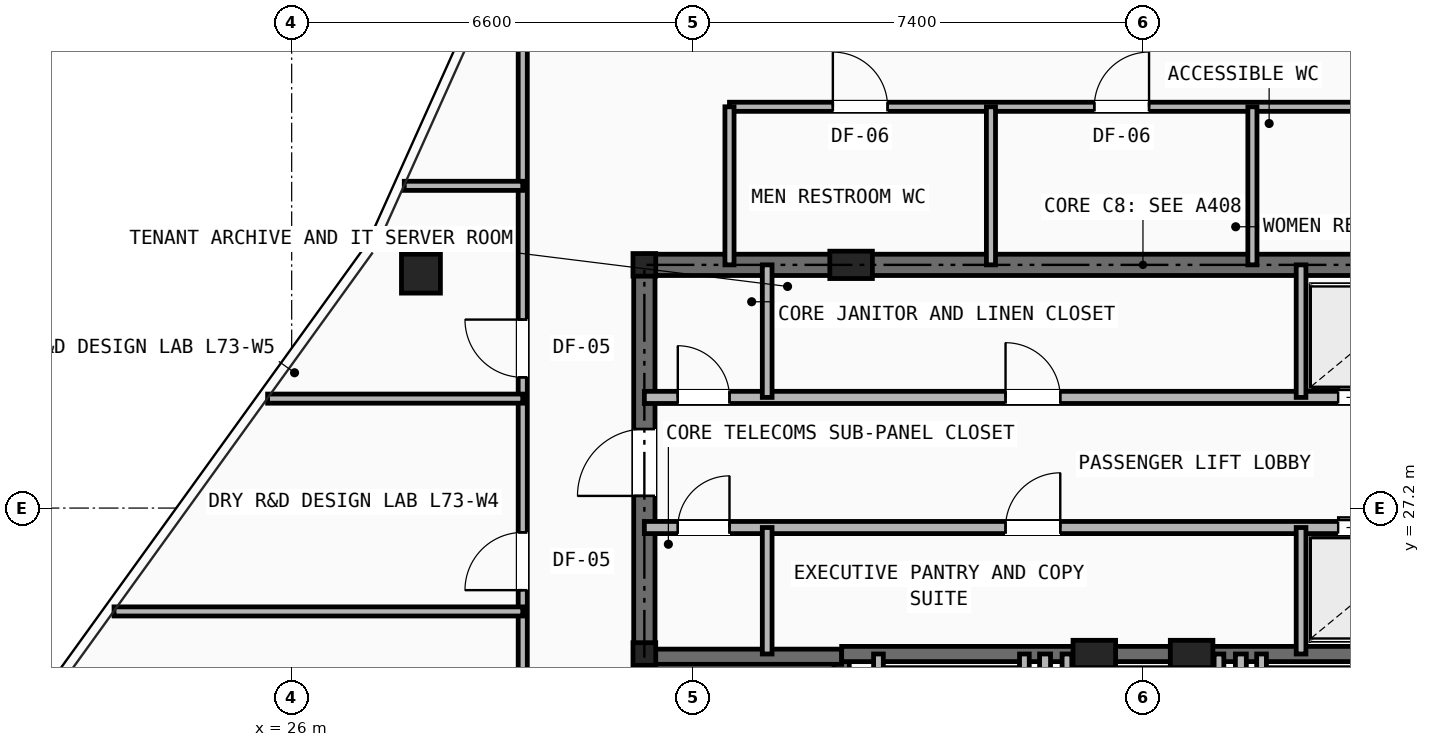
"""IFC4 building model, lengths in metres.
Left out: names, types, materials, properties, quantities, classifications, styles, units other than length and angle.
Written with IfcOpenShell. Run it as: python <this file> out.ifc"""

import sys

from ifc_helpers import new_model, si_unit, direction, frame, frame_2d, origin, origin_2d, place, context, subcontext, project, spatial, rectangle, hollow_rectangle, i_section, extrude, element, fill, save


model = new_model("IFC4")
c1 = context("Model", 3, precision=1e-05, world=origin(), true_north=direction((0.0, 1.0)))
c2 = subcontext(c1, "Body", "Model", "MODEL_VIEW")
j1 = project(units=[si_unit("LENGTHUNIT", "METRE"), si_unit("PLANEANGLEUNIT", "RADIAN")], contexts=[c1])
p1 = place(None, origin())
s1 = spatial("IfcSite", under=j1, at=p1, CompositionType="ELEMENT")
p2 = place(p1, origin())
s2 = spatial("IfcBuilding", under=s1, at=p2, CompositionType="ELEMENT")
p3 = place(p2, frame((0.0, 0.0, 258.5)))
s3 = spatial("IfcBuildingStorey", under=s2, at=p3, CompositionType="ELEMENT", Elevation=258.5)
for number, where, z_axis, x_axis in (
    (1, (31.8, 24.8, 0.0), (0.0, 0.0, 1.0), (1.0, 0.0, 0.0)),
    (2, (31.8, 31.2, 0.0), (0.0, 0.0, 1.0), (1.0, 0.0, 0.0)),
):
    element("IfcColumn", number, at=place(p3, frame(where, z_axis=z_axis, x_axis=x_axis)), inside=s3, PredefinedType="COLUMN", context=c2, shape_type="SweptSolid", body=[
        extrude(i_section(OverallWidth=0.374, OverallDepth=0.372, WebThickness=0.016, FlangeThickness=0.026, at=origin_2d()), origin(), (0.0, 0.0, 1.0), 3.5),
    ])
for number, where, z_axis, x_axis in (
    (3, (35.2, 31.2, 0.0), (0.0, 0.0, 1.0), (1.0, 0.0, 0.0)),
    (4, (39.2, 24.8, 0.0), (0.0, 0.0, 1.0), (1.0, 0.0, 0.0)),
    (5, (40.8, 24.8, 0.0), (0.0, 0.0, 1.0), (1.0, 0.0, 0.0)),
):
    element("IfcColumn", number, at=place(p3, frame(where, z_axis=z_axis, x_axis=x_axis)), inside=s3, PredefinedType="PILASTER", context=c2, shape_type="SweptSolid", body=[
        extrude(rectangle(XDim=0.7, YDim=0.45, at=origin_2d()), origin(), (0.0, 0.0, 1.0), 3.5),
    ])
p4 = place(p3, frame((28.126, 31.056, 0.0), z_axis=(0.0, 0.0, 1.0), x_axis=(1.0, 0.0, 0.0)))
e6 = element("IfcColumn", 6, at=p4, inside=s3, PredefinedType="COLUMN", context=c2, shape_type="SweptSolid", body=[
    extrude(hollow_rectangle(XDim=0.64, YDim=0.64, WallThickness=0.045, at=origin_2d()), origin(), (0.0, 0.0, 1.0), 3.5),
])
p5 = place(p3, frame((31.8, 31.2, 0.0), z_axis=(0.0, 0.0, 1.0), x_axis=(1.0, 0.0, 0.0)))
e7 = element("IfcWall", 7, at=p5, inside=s3, PredefinedType="SHEAR", context=c2, shape_type="SweptSolid", body=[
    extrude(rectangle(XDim=16.4, YDim=0.35, at=frame_2d((8.2, 0.0))), origin(), (0.0, 0.0, 1.0), 3.25),
])
p6 = place(p3, frame((31.8, 16.4, 0.0), z_axis=(0.0, 0.0, 1.0), x_axis=(0.0, 1.0, 0.0)))
e8 = element("IfcWall", 8, at=p6, inside=s3, PredefinedType="SHEAR", context=c2, shape_type="SweptSolid", body=[
    extrude(rectangle(XDim=14.8, YDim=0.35, at=frame_2d((7.4, 0.0))), origin(), (0.0, 0.0, 1.0), 3.25),
])
p7 = place(p6, frame((11.0, 0.0, 0.0)))
e9 = element("IfcOpeningElement", 9, at=p7, cuts=e8, PredefinedType="OPENING", context=c2, shape_type="SweptSolid", body=[
    extrude(rectangle(XDim=1.1, YDim=2.15, at=frame_2d((0.55, 1.075))), frame((0.0, 0.185, 0.0), z_axis=(0.0, -1.0, 0.0), x_axis=(1.0, 0.0, 0.0)), (0.0, 0.0, 1.0), 0.37),
])
p8 = place(p3, frame((35.045, 16.4, 0.0), z_axis=(0.0, 0.0, 1.0), x_axis=(0.0, 1.0, 0.0)))
e10 = element("IfcWall", 10, at=p8, inside=s3, PredefinedType="SHEAR", context=c2, shape_type="SweptSolid", body=[
    extrude(rectangle(XDim=8.4, YDim=0.25, at=frame_2d((4.2, 0.0))), origin(), (0.0, 0.0, 1.0), 3.25),
])
p9 = place(p8, frame((0.45, 0.0, 0.0)))
e11 = element("IfcOpeningElement", 11, at=p9, cuts=e10, PredefinedType="OPENING", context=c2, shape_type="SweptSolid", body=[
    extrude(rectangle(XDim=0.95, YDim=2.1, at=frame_2d((0.475, 1.05))), frame((0.0, 0.135, 0.0), z_axis=(0.0, -1.0, 0.0), x_axis=(1.0, 0.0, 0.0)), (0.0, 0.0, 1.0), 0.27),
])
p10 = place(p3, frame((31.8, 24.755, 0.0), z_axis=(0.0, 0.0, 1.0), x_axis=(1.0, 0.0, 0.0)))
e12 = element("IfcWall", 12, at=p10, inside=s3, PredefinedType="SHEAR", context=c2, shape_type="SweptSolid", body=[
    extrude(rectangle(XDim=3.245, YDim=0.25, at=frame_2d((1.623, 0.0))), origin(), (0.0, 0.0, 1.0), 3.25),
])
p11 = place(p3, frame((35.045, 24.8, 0.0), z_axis=(0.0, 0.0, 1.0), x_axis=(1.0, 0.0, 0.0)))
e13 = element("IfcWall", 13, at=p11, inside=s3, PredefinedType="SHEAR", context=c2, shape_type="SweptSolid", body=[
    extrude(rectangle(XDim=9.91, YDim=0.25, at=frame_2d((4.955, 0.0))), origin(), (0.0, 0.0, 1.0), 3.25),
])
p12 = place(p3, frame((38.39, 16.4, 0.0), z_axis=(0.0, 0.0, 1.0), x_axis=(0.0, 1.0, 0.0)))
e14 = element("IfcWall", 14, at=p12, inside=s3, PredefinedType="PARTITIONING", context=c2, shape_type="SweptSolid", body=[
    extrude(rectangle(XDim=8.4, YDim=0.18, at=frame_2d((4.2, 0.0))), origin(), (0.0, 0.0, 1.0), 2.705),
])
p13 = place(p12, frame((4.45, 0.0, 0.0)))
e15 = element("IfcOpeningElement", 15, at=p13, cuts=e14, PredefinedType="OPENING", context=c2, shape_type="SweptSolid", body=[
    extrude(rectangle(XDim=0.95, YDim=2.1, at=frame_2d((0.475, 1.05))), frame((0.0, 0.1, 0.0), z_axis=(0.0, -1.0, 0.0), x_axis=(1.0, 0.0, 0.0)), (0.0, 0.0, 1.0), 0.2),
])
p14 = place(p3, frame((41.61, 16.4, 0.0), z_axis=(0.0, 0.0, 1.0), x_axis=(0.0, 1.0, 0.0)))
e16 = element("IfcWall", 16, at=p14, inside=s3, PredefinedType="PARTITIONING", context=c2, shape_type="SweptSolid", body=[
    extrude(rectangle(XDim=8.4, YDim=0.18, at=frame_2d((4.2, 0.0))), origin(), (0.0, 0.0, 1.0), 2.705),
])
p15 = place(p14, frame((2.5, 0.0, 0.0)))
e17 = element("IfcOpeningElement", 17, at=p15, cuts=e16, PredefinedType="OPENING", context=c2, shape_type="SweptSolid", body=[
    extrude(rectangle(XDim=0.85, YDim=2.05, at=frame_2d((0.425, 1.025))), frame((0.0, 0.1, 0.0), z_axis=(0.0, -1.0, 0.0), x_axis=(1.0, 0.0, 0.0)), (0.0, 0.0, 1.0), 0.2),
])
for number, where, z_axis, x_axis in (
    (18, (35.65, 22.48, 0.0), (0.0, 0.0, 1.0), (0.0, 1.0, 0.0)),
    (19, (38.05, 22.48, 0.0), (0.0, 0.0, 1.0), (0.0, 1.0, 0.0)),
    (20, (41.95, 22.48, 0.0), (0.0, 0.0, 1.0), (0.0, 1.0, 0.0)),
    (21, (38.75, 22.48, 0.0), (0.0, 0.0, 1.0), (0.0, 1.0, 0.0)),
    (22, (41.25, 22.48, 0.0), (0.0, 0.0, 1.0), (0.0, 1.0, 0.0)),
):
    element("IfcWall", number, at=place(p3, frame(where, z_axis=z_axis, x_axis=x_axis)), inside=s3, PredefinedType="SOLIDWALL", context=c2, shape_type="SweptSolid", body=[
        extrude(rectangle(XDim=2.32, YDim=0.16, at=frame_2d((1.16, 0.0))), origin(), (0.0, 0.0, 1.0), 3.25),
    ])
p16 = place(p3, frame((31.8, 29.02, 0.0), z_axis=(0.0, 0.0, 1.0), x_axis=(1.0, 0.0, 0.0)))
e23 = element("IfcWall", 23, at=p16, inside=s3, PredefinedType="SOLIDWALL", context=c2, shape_type="SweptSolid", body=[
    extrude(rectangle(XDim=16.4, YDim=0.2, at=frame_2d((8.2, 0.0))), origin(), (0.0, 0.0, 1.0), 2.705),
])
p17 = place(p16, frame((0.55, 0.0, 0.0)))
e24 = element("IfcOpeningElement", 24, at=p17, cuts=e23, PredefinedType="OPENING", context=c2, shape_type="SweptSolid", body=[
    extrude(rectangle(XDim=0.85, YDim=2.05, at=frame_2d((0.425, 1.025))), frame((0.0, 0.11, 0.0), z_axis=(0.0, -1.0, 0.0), x_axis=(1.0, 0.0, 0.0)), (0.0, 0.0, 1.0), 0.22),
])
p18 = place(p16, frame((5.94, 0.0, 0.0)))
e25 = element("IfcOpeningElement", 25, at=p18, cuts=e23, PredefinedType="OPENING", context=c2, shape_type="SweptSolid", body=[
    extrude(rectangle(XDim=0.9, YDim=2.1, at=frame_2d((0.45, 1.05))), frame((0.0, 0.11, 0.0), z_axis=(0.0, -1.0, 0.0), x_axis=(1.0, 0.0, 0.0)), (0.0, 0.0, 1.0), 0.22),
])
p19 = place(p16, frame((11.41, 0.0, 0.0)))
e26 = element("IfcOpeningElement", 26, at=p19, cuts=e23, PredefinedType="OPENING", context=c2, shape_type="SweptSolid", body=[
    extrude(rectangle(XDim=1.1, YDim=2.15, at=frame_2d((0.55, 1.075))), frame((0.0, 0.11, 0.0), z_axis=(0.0, -1.0, 0.0), x_axis=(1.0, 0.0, 0.0)), (0.0, 0.0, 1.0), 0.22),
])
p20 = place(p16, frame((13.73, 0.0, 0.0)))
e27 = element("IfcOpeningElement", 27, at=p20, cuts=e23, PredefinedType="OPENING", context=c2, shape_type="SweptSolid", body=[
    extrude(rectangle(XDim=1.1, YDim=2.15, at=frame_2d((0.55, 1.075))), frame((0.0, 0.11, 0.0), z_axis=(0.0, -1.0, 0.0), x_axis=(1.0, 0.0, 0.0)), (0.0, 0.0, 1.0), 0.22),
])
p21 = place(p3, frame((31.8, 26.88, 0.0), z_axis=(0.0, 0.0, 1.0), x_axis=(1.0, 0.0, 0.0)))
e28 = element("IfcWall", 28, at=p21, inside=s3, PredefinedType="SOLIDWALL", context=c2, shape_type="SweptSolid", body=[
    extrude(rectangle(XDim=16.4, YDim=0.2, at=frame_2d((8.2, 0.0))), origin(), (0.0, 0.0, 1.0), 2.705),
])
p22 = place(p21, frame((0.55, 0.0, 0.0)))
e29 = element("IfcOpeningElement", 29, at=p22, cuts=e28, PredefinedType="OPENING", context=c2, shape_type="SweptSolid", body=[
    extrude(rectangle(XDim=0.85, YDim=2.05, at=frame_2d((0.425, 1.025))), frame((0.0, 0.11, 0.0), z_axis=(0.0, -1.0, 0.0), x_axis=(1.0, 0.0, 0.0)), (0.0, 0.0, 1.0), 0.22),
])
p23 = place(p21, frame((5.94, 0.0, 0.0)))
e30 = element("IfcOpeningElement", 30, at=p23, cuts=e28, PredefinedType="OPENING", context=c2, shape_type="SweptSolid", body=[
    extrude(rectangle(XDim=0.9, YDim=2.1, at=frame_2d((0.45, 1.05))), frame((0.0, 0.11, 0.0), z_axis=(0.0, -1.0, 0.0), x_axis=(1.0, 0.0, 0.0)), (0.0, 0.0, 1.0), 0.22),
])
p24 = place(p21, frame((11.41, 0.0, 0.0)))
e31 = element("IfcOpeningElement", 31, at=p24, cuts=e28, PredefinedType="OPENING", context=c2, shape_type="SweptSolid", body=[
    extrude(rectangle(XDim=1.1, YDim=2.15, at=frame_2d((0.55, 1.075))), frame((0.0, 0.11, 0.0), z_axis=(0.0, -1.0, 0.0), x_axis=(1.0, 0.0, 0.0)), (0.0, 0.0, 1.0), 0.22),
])
p25 = place(p21, frame((13.73, 0.0, 0.0)))
e32 = element("IfcOpeningElement", 32, at=p25, cuts=e28, PredefinedType="OPENING", context=c2, shape_type="SweptSolid", body=[
    extrude(rectangle(XDim=1.1, YDim=2.15, at=frame_2d((0.55, 1.075))), frame((0.0, 0.11, 0.0), z_axis=(0.0, -1.0, 0.0), x_axis=(1.0, 0.0, 0.0)), (0.0, 0.0, 1.0), 0.22),
])
p26 = place(p3, frame((33.82, 29.02, 0.0), z_axis=(0.0, 0.0, 1.0), x_axis=(0.0, 1.0, 0.0)))
e33 = element("IfcWall", 33, at=p26, inside=s3, PredefinedType="SOLIDWALL", context=c2, shape_type="SweptSolid", body=[
    extrude(rectangle(XDim=2.18, YDim=0.16, at=frame_2d((1.09, 0.0))), origin(), (0.0, 0.0, 1.0), 2.705),
])
p27 = place(p3, frame((33.82, 24.8, 0.0), z_axis=(0.0, 0.0, 1.0), x_axis=(0.0, 1.0, 0.0)))
e34 = element("IfcWall", 34, at=p27, inside=s3, PredefinedType="SOLIDWALL", context=c2, shape_type="SweptSolid", body=[
    extrude(rectangle(XDim=2.08, YDim=0.16, at=frame_2d((1.04, 0.0))), origin(), (0.0, 0.0, 1.0), 3.25),
])
p28 = place(p3, frame((42.6, 29.02, 0.0), z_axis=(0.0, 0.0, 1.0), x_axis=(0.0, 1.0, 0.0)))
e35 = element("IfcWall", 35, at=p28, inside=s3, PredefinedType="SOLIDWALL", context=c2, shape_type="SweptSolid", body=[
    extrude(rectangle(XDim=2.18, YDim=0.16, at=frame_2d((1.09, 0.0))), origin(), (0.0, 0.0, 1.0), 2.705),
])
p29 = place(p3, frame((42.6, 24.8, 0.0), z_axis=(0.0, 0.0, 1.0), x_axis=(0.0, 1.0, 0.0)))
e36 = element("IfcWall", 36, at=p29, inside=s3, PredefinedType="SOLIDWALL", context=c2, shape_type="SweptSolid", body=[
    extrude(rectangle(XDim=2.08, YDim=0.16, at=frame_2d((1.04, 0.0))), origin(), (0.0, 0.0, 1.0), 3.25),
])
p30 = place(p3, frame((33.2, 33.8, 0.0), z_axis=(0.0, 0.0, 1.0), x_axis=(1.0, 0.0, 0.0)))
e37 = element("IfcWall", 37, at=p30, inside=s3, PredefinedType="PARTITIONING", context=c2, shape_type="SweptSolid", body=[
    extrude(rectangle(XDim=13.0, YDim=0.15, at=frame_2d((6.5, 0.0))), origin(), (0.0, 0.0, 1.0), 3.25),
])
p31 = place(p30, frame((1.7, 0.0, 0.0)))
e38 = element("IfcOpeningElement", 38, at=p31, cuts=e37, PredefinedType="OPENING", context=c2, shape_type="SweptSolid", body=[
    extrude(rectangle(XDim=0.9, YDim=2.1, at=frame_2d((0.45, 1.05))), frame((0.0, 0.085, 0.0), z_axis=(0.0, -1.0, 0.0), x_axis=(1.0, 0.0, 0.0)), (0.0, 0.0, 1.0), 0.17),
])
p32 = place(p30, frame((6.0, 0.0, 0.0)))
e39 = element("IfcOpeningElement", 39, at=p32, cuts=e37, PredefinedType="OPENING", context=c2, shape_type="SweptSolid", body=[
    extrude(rectangle(XDim=0.9, YDim=2.1, at=frame_2d((0.45, 1.05))), frame((0.0, 0.085, 0.0), z_axis=(0.0, -1.0, 0.0), x_axis=(1.0, 0.0, 0.0)), (0.0, 0.0, 1.0), 0.17),
])
p33 = place(p30, frame((10.35, 0.0, 0.0)))
e40 = element("IfcOpeningElement", 40, at=p33, cuts=e37, PredefinedType="OPENING", context=c2, shape_type="SweptSolid", body=[
    extrude(rectangle(XDim=0.9, YDim=2.1, at=frame_2d((0.45, 1.05))), frame((0.0, 0.085, 0.0), z_axis=(0.0, -1.0, 0.0), x_axis=(1.0, 0.0, 0.0)), (0.0, 0.0, 1.0), 0.17),
])
for number, where, z_axis, x_axis in (
    (41, (33.2, 31.2, 0.0), (0.0, 0.0, 1.0), (0.0, 1.0, 0.0)),
    (42, (37.5, 31.2, 0.0), (0.0, 0.0, 1.0), (0.0, 1.0, 0.0)),
    (43, (41.8, 31.2, 0.0), (0.0, 0.0, 1.0), (0.0, 1.0, 0.0)),
):
    element("IfcWall", number, at=place(p3, frame(where, z_axis=z_axis, x_axis=x_axis)), inside=s3, PredefinedType="PARTITIONING", context=c2, shape_type="SweptSolid", body=[
        extrude(rectangle(XDim=2.6, YDim=0.15, at=frame_2d((1.3, 0.0))), origin(), (0.0, 0.0, 1.0), 2.705),
    ])
p34 = place(p3, frame((29.8, 16.4, 0.0), z_axis=(0.0, 0.0, 1.0), x_axis=(0.0, 1.0, 0.0)))
e44 = element("IfcWall", 44, at=p34, inside=s3, PredefinedType="PARTITIONING", context=c2, shape_type="SweptSolid", body=[
    extrude(rectangle(XDim=19.3, YDim=0.15, at=frame_2d((9.65, 0.0))), origin(), (0.0, 0.0, 1.0), 2.292),
])
p35 = place(p34, frame((0.35, 0.0, 0.0)))
e45 = element("IfcOpeningElement", 45, at=p35, cuts=e44, PredefinedType="OPENING", context=c2, shape_type="SweptSolid", body=[
    extrude(rectangle(XDim=0.95, YDim=2.1, at=frame_2d((0.475, 1.05))), frame((0.0, 0.085, 0.0), z_axis=(0.0, -1.0, 0.0), x_axis=(1.0, 0.0, 0.0)), (0.0, 0.0, 1.0), 0.17),
])
p36 = place(p34, frame((2.95, 0.0, 0.0)))
e46 = element("IfcOpeningElement", 46, at=p36, cuts=e44, PredefinedType="OPENING", context=c2, shape_type="SweptSolid", body=[
    extrude(rectangle(XDim=0.95, YDim=2.1, at=frame_2d((0.475, 1.05))), frame((0.0, 0.085, 0.0), z_axis=(0.0, -1.0, 0.0), x_axis=(1.0, 0.0, 0.0)), (0.0, 0.0, 1.0), 0.17),
])
p37 = place(p34, frame((6.15, 0.0, 0.0)))
e47 = element("IfcOpeningElement", 47, at=p37, cuts=e44, PredefinedType="OPENING", context=c2, shape_type="SweptSolid", body=[
    extrude(rectangle(XDim=0.95, YDim=2.1, at=frame_2d((0.475, 1.05))), frame((0.0, 0.085, 0.0), z_axis=(0.0, -1.0, 0.0), x_axis=(1.0, 0.0, 0.0)), (0.0, 0.0, 1.0), 0.17),
])
p38 = place(p34, frame((9.45, 0.0, 0.0)))
e48 = element("IfcOpeningElement", 48, at=p38, cuts=e44, PredefinedType="OPENING", context=c2, shape_type="SweptSolid", body=[
    extrude(rectangle(XDim=0.95, YDim=2.1, at=frame_2d((0.475, 1.05))), frame((0.0, 0.085, 0.0), z_axis=(0.0, -1.0, 0.0), x_axis=(1.0, 0.0, 0.0)), (0.0, 0.0, 1.0), 0.17),
])
p39 = place(p34, frame((12.95, 0.0, 0.0)))
e49 = element("IfcOpeningElement", 49, at=p39, cuts=e44, PredefinedType="OPENING", context=c2, shape_type="SweptSolid", body=[
    extrude(rectangle(XDim=0.95, YDim=2.1, at=frame_2d((0.475, 1.05))), frame((0.0, 0.085, 0.0), z_axis=(0.0, -1.0, 0.0), x_axis=(1.0, 0.0, 0.0)), (0.0, 0.0, 1.0), 0.17),
])
p40 = place(p3, frame((23.078, 25.5, 0.0), z_axis=(0.0, 0.0, 1.0), x_axis=(1.0, 0.0, 0.0)))
e50 = element("IfcWall", 50, at=p40, inside=s3, PredefinedType="PARTITIONING", context=c2, shape_type="SweptSolid", body=[
    extrude(rectangle(XDim=6.722, YDim=0.15, at=frame_2d((3.361, 0.0))), origin(), (0.0, 0.0, 1.0), 2.628),
])
p41 = place(p3, frame((25.604, 29.0, 0.0), z_axis=(0.0, 0.0, 1.0), x_axis=(1.0, 0.0, 0.0)))
e51 = element("IfcWall", 51, at=p41, inside=s3, PredefinedType="PARTITIONING", context=c2, shape_type="SweptSolid", body=[
    extrude(rectangle(XDim=4.196, YDim=0.15, at=frame_2d((2.098, 0.0))), origin(), (0.0, 0.0, 1.0), 2.628),
])
p42 = place(p3, frame((27.852, 32.5, 0.0), z_axis=(0.0, 0.0, 1.0), x_axis=(1.0, 0.0, 0.0)))
e52 = element("IfcWall", 52, at=p42, inside=s3, PredefinedType="PARTITIONING", context=c2, shape_type="SweptSolid", body=[
    extrude(rectangle(XDim=1.948, YDim=0.15, at=frame_2d((0.974, 0.0))), origin(), (0.0, 0.0, 1.0), 2.628),
])
p43 = place(p17, origin())
e53 = element("IfcDoor", 53, at=p43, inside=s3, OperationType="SINGLE_SWING_LEFT", PredefinedType="DOOR", context=c2, shape_type="SweptSolid", body=[
    extrude(rectangle(XDim=0.85, YDim=2.05, at=frame_2d((0.425, 1.025))), frame((0.0, 0.025, 0.0), z_axis=(0.0, -1.0, 0.0), x_axis=(1.0, 0.0, 0.0)), (0.0, 0.0, 1.0), 0.05),
])
fill(e24, e53)
p44 = place(p22, origin())
e54 = element("IfcDoor", 54, at=p44, inside=s3, OperationType="SINGLE_SWING_RIGHT", PredefinedType="DOOR", context=c2, shape_type="SweptSolid", body=[
    extrude(rectangle(XDim=0.85, YDim=2.05, at=frame_2d((0.425, 1.025))), frame((0.0, 0.025, 0.0), z_axis=(0.0, -1.0, 0.0), x_axis=(1.0, 0.0, 0.0)), (0.0, 0.0, 1.0), 0.05),
])
fill(e29, e54)
p45 = place(p7, origin())
e55 = element("IfcDoor", 55, at=p45, inside=s3, OperationType="SINGLE_SWING_LEFT", PredefinedType="DOOR", context=c2, shape_type="SweptSolid", body=[
    extrude(rectangle(XDim=1.1, YDim=2.15, at=frame_2d((0.55, 1.075))), frame((0.0, 0.025, 0.0), z_axis=(0.0, -1.0, 0.0), x_axis=(1.0, 0.0, 0.0)), (0.0, 0.0, 1.0), 0.05),
])
fill(e9, e55)
p46 = place(p18, origin())
e56 = element("IfcDoor", 56, at=p46, inside=s3, OperationType="SINGLE_SWING_LEFT", PredefinedType="DOOR", context=c2, shape_type="SweptSolid", body=[
    extrude(rectangle(XDim=0.9, YDim=2.1, at=frame_2d((0.45, 1.05))), frame((0.0, 0.025, 0.0), z_axis=(0.0, -1.0, 0.0), x_axis=(1.0, 0.0, 0.0)), (0.0, 0.0, 1.0), 0.05),
])
fill(e25, e56)
p47 = place(p23, origin())
e57 = element("IfcDoor", 57, at=p47, inside=s3, OperationType="SINGLE_SWING_RIGHT", PredefinedType="DOOR", context=c2, shape_type="SweptSolid", body=[
    extrude(rectangle(XDim=0.9, YDim=2.1, at=frame_2d((0.45, 1.05))), frame((0.0, 0.025, 0.0), z_axis=(0.0, -1.0, 0.0), x_axis=(1.0, 0.0, 0.0)), (0.0, 0.0, 1.0), 0.05),
])
fill(e30, e57)
p48 = place(p19, origin())
e58 = element("IfcDoor", 58, at=p48, inside=s3, OperationType="DOUBLE_DOOR_SLIDING", PredefinedType="DOOR", context=c2, shape_type="SweptSolid", body=[
    extrude(rectangle(XDim=1.1, YDim=2.15, at=frame_2d((0.55, 1.075))), frame((0.0, 0.025, 0.0), z_axis=(0.0, -1.0, 0.0), x_axis=(1.0, 0.0, 0.0)), (0.0, 0.0, 1.0), 0.05),
])
fill(e26, e58)
p49 = place(p24, origin())
e59 = element("IfcDoor", 59, at=p49, inside=s3, OperationType="DOUBLE_DOOR_SLIDING", PredefinedType="DOOR", context=c2, shape_type="SweptSolid", body=[
    extrude(rectangle(XDim=1.1, YDim=2.15, at=frame_2d((0.55, 1.075))), frame((0.0, 0.025, 0.0), z_axis=(0.0, -1.0, 0.0), x_axis=(1.0, 0.0, 0.0)), (0.0, 0.0, 1.0), 0.05),
])
fill(e31, e59)
p50 = place(p31, origin())
e60 = element("IfcDoor", 60, at=p50, inside=s3, OperationType="SINGLE_SWING_LEFT", PredefinedType="DOOR", context=c2, shape_type="SweptSolid", body=[
    extrude(rectangle(XDim=0.9, YDim=2.1, at=frame_2d((0.45, 1.05))), frame((0.0, 0.025, 0.0), z_axis=(0.0, -1.0, 0.0), x_axis=(1.0, 0.0, 0.0)), (0.0, 0.0, 1.0), 0.05),
])
fill(e38, e60)
p51 = place(p32, origin())
e61 = element("IfcDoor", 61, at=p51, inside=s3, OperationType="SINGLE_SWING_RIGHT", PredefinedType="DOOR", context=c2, shape_type="SweptSolid", body=[
    extrude(rectangle(XDim=0.9, YDim=2.1, at=frame_2d((0.45, 1.05))), frame((0.0, 0.025, 0.0), z_axis=(0.0, -1.0, 0.0), x_axis=(1.0, 0.0, 0.0)), (0.0, 0.0, 1.0), 0.05),
])
fill(e39, e61)
p52 = place(p38, origin())
e62 = element("IfcDoor", 62, at=p52, inside=s3, OperationType="SINGLE_SWING_LEFT", PredefinedType="DOOR", context=c2, shape_type="SweptSolid", body=[
    extrude(rectangle(XDim=0.95, YDim=2.1, at=frame_2d((0.475, 1.05))), frame((0.0, 0.025, 0.0), z_axis=(0.0, -1.0, 0.0), x_axis=(1.0, 0.0, 0.0)), (0.0, 0.0, 1.0), 0.05),
])
fill(e48, e62)
p53 = place(p39, origin())
e63 = element("IfcDoor", 63, at=p53, inside=s3, OperationType="SINGLE_SWING_RIGHT", PredefinedType="DOOR", context=c2, shape_type="SweptSolid", body=[
    extrude(rectangle(XDim=0.95, YDim=2.1, at=frame_2d((0.475, 1.05))), frame((0.0, 0.025, 0.0), z_axis=(0.0, -1.0, 0.0), x_axis=(1.0, 0.0, 0.0)), (0.0, 0.0, 1.0), 0.05),
])
fill(e49, e63)
save(model, sys.argv[1])
